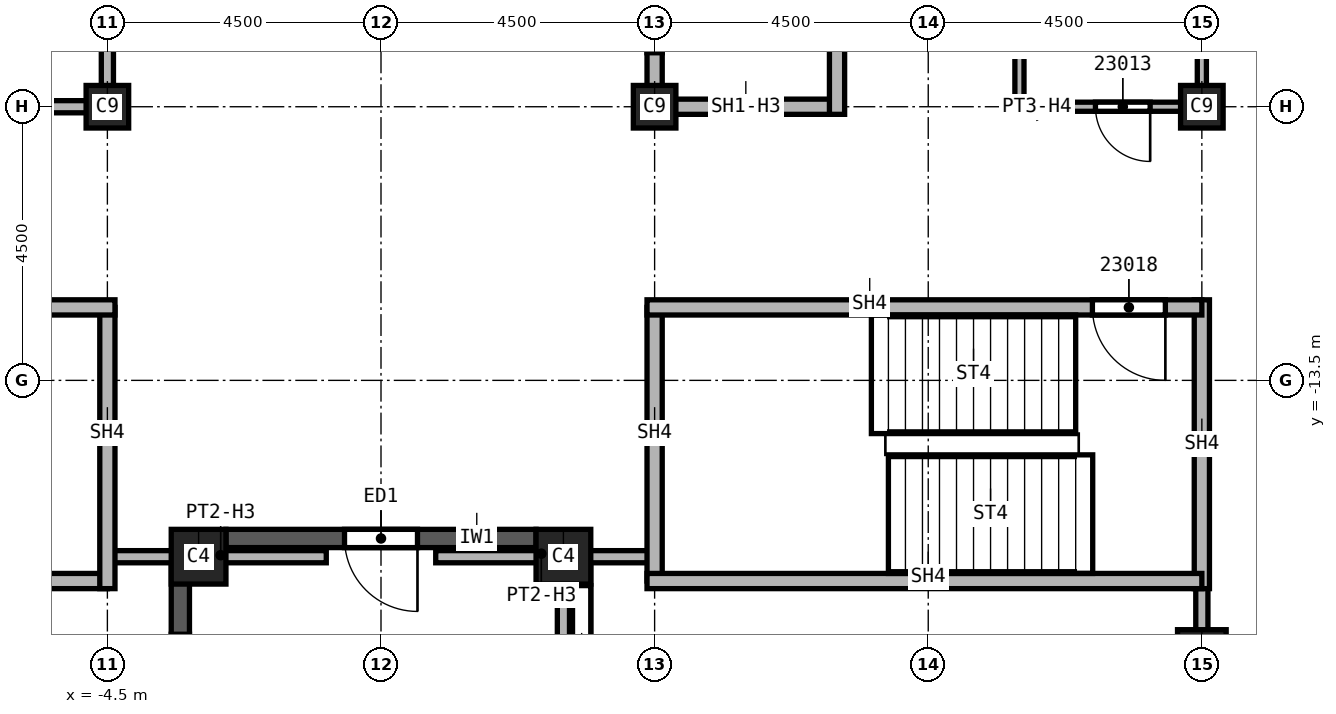
"""IFC4 building model, lengths in metres.
Left out: names, types, materials, properties, quantities, classifications, styles, units other than length and angle.
Written with IfcOpenShell. Run it as: python <this file> out.ifc"""

import sys

from ifc_helpers import new_model, si_unit, direction, frame, frame_2d, origin, origin_2d, place, context, subcontext, project, spatial, rectangle, extrude, element, fill, save


model = new_model("IFC4")
c1 = context("Model", 3, precision=1e-05, world=origin(), true_north=direction((0.0, 1.0)))
c2 = subcontext(c1, "Body", "Model", "MODEL_VIEW")
j1 = project(units=[si_unit("LENGTHUNIT", "METRE"), si_unit("PLANEANGLEUNIT", "RADIAN")], contexts=[c1])
p1 = place(None, origin())
s1 = spatial("IfcSite", under=j1, at=p1, CompositionType="ELEMENT")
p2 = place(p1, origin())
s2 = spatial("IfcBuilding", under=s1, at=p2, CompositionType="ELEMENT")
p3 = place(p2, frame((0.0, 0.0, 326.0)))
s3 = spatial("IfcBuildingStorey", under=s2, at=p3, CompositionType="ELEMENT", Elevation=326.0)
p4 = place(p3, frame((13.5, -18.0, 0.0), z_axis=(0.0, 0.0, 1.0), x_axis=(1.0, 0.0, 0.0)))
e1 = element("IfcColumn", 1, at=p4, inside=s3, PredefinedType="COLUMN", context=c2, shape_type="SweptSolid", body=[
    extrude(rectangle(XDim=0.8, YDim=0.8, at=origin_2d()), origin(), (0.0, 0.0, 1.0), 3.74),
])
for number, where, z_axis, x_axis in (
    (2, (4.5, -9.0, 0.0), (0.0, 0.0, 1.0), (1.0, 0.0, 0.0)),
    (3, (13.5, -9.0, 0.0), (0.0, 0.0, 1.0), (1.0, 0.0, 0.0)),
    (4, (-4.5, -9.0, 0.0), (0.0, 0.0, 1.0), (1.0, 0.0, 0.0)),
):
    element("IfcColumn", number, at=place(p3, frame(where, z_axis=z_axis, x_axis=x_axis)), inside=s3, PredefinedType="COLUMN", context=c2, shape_type="SweptSolid", body=[
        extrude(rectangle(XDim=0.7, YDim=0.7, at=origin_2d()), origin(), (0.0, 0.0, 1.0), 3.74),
    ])
for number, where, z_axis, x_axis in (
    (5, (3.0, -16.4, 0.0), (0.0, 0.0, 1.0), (1.0, 0.0, 0.0)),
    (6, (-3.0, -16.4, 0.0), (0.0, 0.0, 1.0), (1.0, 0.0, 0.0)),
):
    element("IfcColumn", number, at=place(p3, frame(where, z_axis=z_axis, x_axis=x_axis)), inside=s3, PredefinedType="COLUMN", context=c2, shape_type="SweptSolid", body=[
        extrude(rectangle(XDim=0.9, YDim=0.9, at=origin_2d()), origin(), (0.0, 0.0, 1.0), 3.74),
    ])
p5 = place(p3, frame((-3.3, -24.95, 0.0), z_axis=(0.0, 0.0, 1.0), x_axis=(0.0, 1.0, 0.0)))
e7 = element("IfcWall", 7, at=p5, inside=s3, PredefinedType="SOLIDWALL", context=c2, shape_type="SweptSolid", body=[
    extrude(rectangle(XDim=8.5, YDim=0.3, at=frame_2d((4.25, 0.0))), origin(), (0.0, 0.0, 1.0), 3.14),
])
p6 = place(p5, frame((0.825, 0.0, 0.8)))
e8 = element("IfcOpeningElement", 8, at=p6, cuts=e7, PredefinedType="OPENING", context=c2, shape_type="SweptSolid", body=[
    extrude(rectangle(XDim=2.4, YDim=1.95, at=frame_2d((1.2, 0.975))), frame((0.0, 0.15, 0.0), z_axis=(0.0, -1.0, 0.0), x_axis=(1.0, 0.0, 0.0)), (0.0, 0.0, 1.0), 0.3),
])
p7 = place(p5, frame((4.875, 0.0, 0.8)))
e9 = element("IfcOpeningElement", 9, at=p7, cuts=e7, PredefinedType="OPENING", context=c2, shape_type="SweptSolid", body=[
    extrude(rectangle(XDim=2.4, YDim=1.95, at=frame_2d((1.2, 0.975))), frame((0.0, 0.15, 0.0), z_axis=(0.0, -1.0, 0.0), x_axis=(1.0, 0.0, 0.0)), (0.0, 0.0, 1.0), 0.3),
])
p8 = place(p3, frame((2.55, -16.1, 0.0), z_axis=(0.0, 0.0, 1.0), x_axis=(-1.0, 0.0, 0.0)))
e10 = element("IfcWall", 10, at=p8, inside=s3, PredefinedType="SOLIDWALL", context=c2, shape_type="SweptSolid", body=[
    extrude(rectangle(XDim=5.1, YDim=0.3, at=frame_2d((2.55, 0.0))), origin(), (0.0, 0.0, 1.0), 3.14),
])
p9 = place(p8, frame((1.95, 0.0, 0.0)))
e11 = element("IfcOpeningElement", 11, at=p9, cuts=e10, PredefinedType="OPENING", context=c2, shape_type="SweptSolid", body=[
    extrude(rectangle(XDim=1.2, YDim=2.4, at=frame_2d((0.6, 1.2))), frame((0.0, 0.15, 0.0), z_axis=(0.0, -1.0, 0.0), x_axis=(1.0, 0.0, 0.0)), (0.0, 0.0, 1.0), 0.3),
])
p10 = place(p3, frame((3.3, -16.45, 0.0), z_axis=(0.0, 0.0, 1.0), x_axis=(0.0, -1.0, 0.0)))
e12 = element("IfcWall", 12, at=p10, inside=s3, PredefinedType="SOLIDWALL", context=c2, shape_type="SweptSolid", body=[
    extrude(rectangle(XDim=8.5, YDim=0.3, at=frame_2d((4.25, 0.0))), origin(), (0.0, 0.0, 1.0), 3.14),
])
p11 = place(p10, frame((0.425, 0.0, 0.8)))
e13 = element("IfcOpeningElement", 13, at=p11, cuts=e12, PredefinedType="OPENING", context=c2, shape_type="SweptSolid", body=[
    extrude(rectangle(XDim=2.4, YDim=1.95, at=frame_2d((1.2, 0.975))), frame((0.0, 0.15, 0.0), z_axis=(0.0, -1.0, 0.0), x_axis=(1.0, 0.0, 0.0)), (0.0, 0.0, 1.0), 0.3),
])
p12 = place(p10, frame((4.475, 0.0, 0.8)))
e14 = element("IfcOpeningElement", 14, at=p12, cuts=e12, PredefinedType="OPENING", context=c2, shape_type="SweptSolid", body=[
    extrude(rectangle(XDim=2.4, YDim=1.95, at=frame_2d((1.2, 0.975))), frame((0.0, 0.15, 0.0), z_axis=(0.0, -1.0, 0.0), x_axis=(1.0, 0.0, 0.0)), (0.0, 0.0, 1.0), 0.3),
])
p13 = place(p3, frame((-0.9, -16.4, 0.0), z_axis=(0.0, 0.0, 1.0), x_axis=(-1.0, 0.0, 0.0)))
e15 = element("IfcWall", 15, at=p13, inside=s3, PredefinedType="PARTITIONING", context=c2, shape_type="SweptSolid", body=[
    extrude(rectangle(XDim=3.6, YDim=0.2, at=frame_2d((1.8, 0.0))), origin(), (0.0, 0.0, 1.0), 3.204),
])
p14 = place(p3, frame((3.0, -16.4, 0.0), z_axis=(0.0, 0.0, 1.0), x_axis=(0.0, -1.0, 0.0)))
e16 = element("IfcWall", 16, at=p14, inside=s3, PredefinedType="PARTITIONING", context=c2, shape_type="SweptSolid", body=[
    extrude(rectangle(XDim=8.55, YDim=0.2, at=frame_2d((4.275, 0.0))), origin(), (0.0, 0.0, 1.0), 2.894),
])
p15 = place(p3, frame((4.5, -16.4, 0.0), z_axis=(0.0, 0.0, 1.0), x_axis=(-1.0, 0.0, 0.0)))
e17 = element("IfcWall", 17, at=p15, inside=s3, PredefinedType="PARTITIONING", context=c2, shape_type="SweptSolid", body=[
    extrude(rectangle(XDim=3.6, YDim=0.2, at=frame_2d((1.8, 0.0))), origin(), (0.0, 0.0, 1.0), 3.204),
])
p16 = place(p3, frame((13.5, -24.95, 0.0), z_axis=(0.0, 0.0, 1.0), x_axis=(0.0, 1.0, 0.0)))
e18 = element("IfcWall", 18, at=p16, inside=s3, PredefinedType="PARTITIONING", context=c2, shape_type="SweptSolid", body=[
    extrude(rectangle(XDim=8.275, YDim=0.2, at=frame_2d((4.137, 0.0))), origin(), (0.0, 0.0, 1.0), 3.74),
])
p17 = place(p16, frame((1.0, 0.0, 0.0)))
e19 = element("IfcOpeningElement", 19, at=p17, cuts=e18, PredefinedType="OPENING", context=c2, shape_type="SweptSolid", body=[
    extrude(rectangle(XDim=1.0, YDim=2.1, at=frame_2d((0.5, 1.05))), frame((0.0, 0.1, 0.0), z_axis=(0.0, -1.0, 0.0), x_axis=(1.0, 0.0, 0.0)), (0.0, 0.0, 1.0), 0.2),
])
p18 = place(p3, frame((-4.5, -9.0, 0.0), z_axis=(0.0, 0.0, 1.0), x_axis=(-1.0, 0.0, 0.0)))
e20 = element("IfcWall", 20, at=p18, inside=s3, PredefinedType="SOLIDWALL", context=c2, shape_type="SweptSolid", body=[
    extrude(rectangle(XDim=3.0, YDim=0.2, at=frame_2d((1.5, 0.0))), origin(), (0.0, 0.0, 1.0), 3.062),
])
p19 = place(p3, frame((-4.5, 6.0, 0.0), z_axis=(0.0, 0.0, 1.0), x_axis=(0.0, -1.0, 0.0)))
e21 = element("IfcWall", 21, at=p19, inside=s3, PredefinedType="SOLIDWALL", context=c2, shape_type="SweptSolid", body=[
    extrude(rectangle(XDim=15.1, YDim=0.2, at=frame_2d((7.55, 0.0))), origin(), (0.0, 0.0, 1.0), 3.062),
])
p20 = place(p19, frame((12.25, 0.0, 0.0)))
e22 = element("IfcOpeningElement", 22, at=p20, cuts=e21, PredefinedType="OPENING", context=c2, shape_type="SweptSolid", body=[
    extrude(rectangle(XDim=1.1, YDim=2.1, at=frame_2d((0.55, 1.05))), frame((0.0, 0.1, 0.0), z_axis=(0.0, -1.0, 0.0), x_axis=(1.0, 0.0, 0.0)), (0.0, 0.0, 1.0), 0.2),
])
p21 = place(p19, frame((8.2, 0.0, 0.0)))
e23 = element("IfcOpeningElement", 23, at=p21, cuts=e21, PredefinedType="OPENING", context=c2, shape_type="SweptSolid", body=[
    extrude(rectangle(XDim=1.1, YDim=2.1, at=frame_2d((0.55, 1.05))), frame((0.0, 0.1, 0.0), z_axis=(0.0, -1.0, 0.0), x_axis=(1.0, 0.0, 0.0)), (0.0, 0.0, 1.0), 0.2),
])
p22 = place(p3, frame((4.5, -9.125, 0.0), z_axis=(0.0, 0.0, 1.0), x_axis=(0.0, 1.0, 0.0)))
e24 = element("IfcWall", 24, at=p22, inside=s3, PredefinedType="SOLIDWALL", context=c2, shape_type="SweptSolid", body=[
    extrude(rectangle(XDim=3.125, YDim=0.25, at=frame_2d((1.562, 0.0))), origin(), (0.0, 0.0, 1.0), 3.062),
])
p23 = place(p22, frame((1.012, 0.0, 0.0)))
e25 = element("IfcOpeningElement", 25, at=p23, cuts=e24, PredefinedType="OPENING", context=c2, shape_type="SweptSolid", body=[
    extrude(rectangle(XDim=1.1, YDim=2.1, at=frame_2d((0.55, 1.05))), frame((0.0, 0.125, 0.0), z_axis=(0.0, -1.0, 0.0), x_axis=(1.0, 0.0, 0.0)), (0.0, 0.0, 1.0), 0.25),
])
p24 = place(p3, frame((7.5, -9.0, 0.0), z_axis=(0.0, 0.0, 1.0), x_axis=(-1.0, 0.0, 0.0)))
e26 = element("IfcWall", 26, at=p24, inside=s3, PredefinedType="SOLIDWALL", context=c2, shape_type="SweptSolid", body=[
    extrude(rectangle(XDim=3.0, YDim=0.25, at=frame_2d((1.5, 0.0))), origin(), (0.0, 0.0, 1.0), 3.062),
])
p25 = place(p3, frame((7.5, -6.0, 0.0), z_axis=(0.0, 0.0, 1.0), x_axis=(0.0, -1.0, 0.0)))
e27 = element("IfcWall", 27, at=p25, inside=s3, PredefinedType="SOLIDWALL", context=c2, shape_type="SweptSolid", body=[
    extrude(rectangle(XDim=3.125, YDim=0.25, at=frame_2d((1.562, 0.0))), origin(), (0.0, 0.0, 1.0), 3.74),
])
p26 = place(p3, frame((-4.5, -16.8, 0.0), z_axis=(0.0, 0.0, 1.0), x_axis=(-1.0, 0.0, 0.0)))
e28 = element("IfcWall", 28, at=p26, inside=s3, PredefinedType="SOLIDWALL", context=c2, shape_type="SweptSolid", body=[
    extrude(rectangle(XDim=9.0, YDim=0.25, at=frame_2d((4.5, 0.0))), origin(), (0.0, 0.0, 1.0), 3.74),
])
p27 = place(p3, frame((-4.5, -12.3, 0.0), z_axis=(0.0, 0.0, 1.0), x_axis=(0.0, -1.0, 0.0)))
e29 = element("IfcWall", 29, at=p27, inside=s3, PredefinedType="SOLIDWALL", context=c2, shape_type="SweptSolid", body=[
    extrude(rectangle(XDim=4.625, YDim=0.25, at=frame_2d((2.312, 0.0))), origin(), (0.0, 0.0, 1.0), 3.74),
])
p28 = place(p3, frame((-4.375, -12.3, 0.0), z_axis=(0.0, 0.0, 1.0), x_axis=(-1.0, 0.0, 0.0)))
e30 = element("IfcWall", 30, at=p28, inside=s3, PredefinedType="SOLIDWALL", context=c2, shape_type="SweptSolid", body=[
    extrude(rectangle(XDim=9.125, YDim=0.25, at=frame_2d((4.562, 0.0))), origin(), (0.0, 0.0, 1.0), 3.74),
])
p29 = place(p28, frame((7.2, 0.0, 0.0)))
e31 = element("IfcOpeningElement", 31, at=p29, cuts=e30, PredefinedType="OPENING", context=c2, shape_type="SweptSolid", body=[
    extrude(rectangle(XDim=1.2, YDim=2.1, at=frame_2d((0.6, 1.05))), frame((0.0, 0.125, 0.0), z_axis=(0.0, -1.0, 0.0), x_axis=(1.0, 0.0, 0.0)), (0.0, 0.0, 1.0), 0.25),
])
p30 = place(p3, frame((4.5, -16.8, 0.0), z_axis=(0.0, 0.0, 1.0), x_axis=(0.0, 1.0, 0.0)))
e32 = element("IfcWall", 32, at=p30, inside=s3, PredefinedType="SOLIDWALL", context=c2, shape_type="SweptSolid", body=[
    extrude(rectangle(XDim=4.5, YDim=0.25, at=frame_2d((2.25, 0.0))), origin(), (0.0, 0.0, 1.0), 3.74),
])
p31 = place(p3, frame((13.5, -16.925, 0.0), z_axis=(0.0, 0.0, 1.0), x_axis=(0.0, 1.0, 0.0)))
e33 = element("IfcWall", 33, at=p31, inside=s3, PredefinedType="SOLIDWALL", context=c2, shape_type="SweptSolid", body=[
    extrude(rectangle(XDim=4.75, YDim=0.25, at=frame_2d((2.375, 0.0))), origin(), (0.0, 0.0, 1.0), 3.74),
])
p32 = place(p3, frame((13.5, -16.8, 0.0), z_axis=(0.0, 0.0, 1.0), x_axis=(-1.0, 0.0, 0.0)))
e34 = element("IfcWall", 34, at=p32, inside=s3, PredefinedType="SOLIDWALL", context=c2, shape_type="SweptSolid", body=[
    extrude(rectangle(XDim=9.125, YDim=0.25, at=frame_2d((4.562, 0.0))), origin(), (0.0, 0.0, 1.0), 3.74),
])
p33 = place(p3, frame((13.5, -12.3, 0.0), z_axis=(0.0, 0.0, 1.0), x_axis=(-1.0, 0.0, 0.0)))
e35 = element("IfcWall", 35, at=p33, inside=s3, PredefinedType="SOLIDWALL", context=c2, shape_type="SweptSolid", body=[
    extrude(rectangle(XDim=9.125, YDim=0.25, at=frame_2d((4.562, 0.0))), origin(), (0.0, 0.0, 1.0), 3.74),
])
p34 = place(p33, frame((0.6, 0.0, 0.0)))
e36 = element("IfcOpeningElement", 36, at=p34, cuts=e35, PredefinedType="OPENING", context=c2, shape_type="SweptSolid", body=[
    extrude(rectangle(XDim=1.2, YDim=2.1, at=frame_2d((0.6, 1.05))), frame((0.0, 0.125, 0.0), z_axis=(0.0, -1.0, 0.0), x_axis=(1.0, 0.0, 0.0)), (0.0, 0.0, 1.0), 0.25),
])
p35 = place(p3, frame((10.5, -6.925, 0.0), z_axis=(0.0, 0.0, 1.0), x_axis=(0.0, -1.0, 0.0)))
e37 = element("IfcWall", 37, at=p35, inside=s3, PredefinedType="PARTITIONING", context=c2, shape_type="SweptSolid", body=[
    extrude(rectangle(XDim=2.15, YDim=0.15, at=frame_2d((1.075, 0.0))), origin(), (0.0, 0.0, 1.0), 3.74),
])
p36 = place(p3, frame((13.5, -9.0, 0.0), z_axis=(0.0, 0.0, 1.0), x_axis=(-1.0, 0.0, 0.0)))
e38 = element("IfcWall", 38, at=p36, inside=s3, PredefinedType="PARTITIONING", context=c2, shape_type="SweptSolid", body=[
    extrude(rectangle(XDim=3.0, YDim=0.15, at=frame_2d((1.5, 0.0))), origin(), (0.0, 0.0, 1.0), 3.062),
])
p37 = place(p36, frame((0.85, 0.0, 0.0)))
e39 = element("IfcOpeningElement", 39, at=p37, cuts=e38, PredefinedType="OPENING", context=c2, shape_type="SweptSolid", body=[
    extrude(rectangle(XDim=0.9, YDim=2.1, at=frame_2d((0.45, 1.05))), frame((0.0, 0.075, 0.0), z_axis=(0.0, -1.0, 0.0), x_axis=(1.0, 0.0, 0.0)), (0.0, 0.0, 1.0), 0.15),
])
p38 = place(p3, frame((13.5, -7.0, 0.0), z_axis=(0.0, 0.0, 1.0), x_axis=(0.0, -1.0, 0.0)))
e40 = element("IfcWall", 40, at=p38, inside=s3, PredefinedType="PARTITIONING", context=c2, shape_type="SweptSolid", body=[
    extrude(rectangle(XDim=2.075, YDim=0.15, at=frame_2d((1.038, 0.0))), origin(), (0.0, 0.0, 1.0), 3.062),
])
p39 = place(p9, origin())
e41 = element("IfcDoor", 41, at=p39, inside=s3, OperationType="SINGLE_SWING_LEFT", PredefinedType="DOOR", context=c2, shape_type="SweptSolid", body=[
    extrude(rectangle(XDim=1.2, YDim=2.4, at=frame_2d((0.6, 1.2))), frame((0.0, 0.025, 0.0), z_axis=(0.0, -1.0, 0.0), x_axis=(1.0, 0.0, 0.0)), (0.0, 0.0, 1.0), 0.05),
])
fill(e11, e41)
p40 = place(p11, origin())
e42 = element("IfcWindow", 42, at=p40, inside=s3, PartitioningType="SINGLE_PANEL", PredefinedType="WINDOW", context=c2, shape_type="SweptSolid", body=[
    extrude(rectangle(XDim=2.4, YDim=1.95, at=frame_2d((1.2, 0.975))), frame((0.0, 0.03, 0.0), z_axis=(0.0, -1.0, 0.0), x_axis=(1.0, 0.0, 0.0)), (0.0, 0.0, 1.0), 0.06),
])
fill(e13, e42)
p41 = place(p37, origin())
e43 = element("IfcDoor", 43, at=p41, inside=s3, OperationType="SINGLE_SWING_RIGHT", PredefinedType="DOOR", context=c2, shape_type="SweptSolid", body=[
    extrude(rectangle(XDim=0.9, YDim=2.1, at=frame_2d((0.45, 1.05))), frame((0.0, 0.025, 0.0), z_axis=(0.0, -1.0, 0.0), x_axis=(1.0, 0.0, 0.0)), (0.0, 0.0, 1.0), 0.05),
])
fill(e39, e43)
p42 = place(p34, origin())
e44 = element("IfcDoor", 44, at=p42, inside=s3, OperationType="SINGLE_SWING_LEFT", PredefinedType="DOOR", context=c2, shape_type="SweptSolid", body=[
    extrude(rectangle(XDim=1.2, YDim=2.1, at=frame_2d((0.6, 1.05))), frame((0.0, 0.025, 0.0), z_axis=(0.0, -1.0, 0.0), x_axis=(1.0, 0.0, 0.0)), (0.0, 0.0, 1.0), 0.05),
])
fill(e36, e44)
p43 = place(p23, origin())
e45 = element("IfcDoor", 45, at=p43, inside=s3, OperationType="SLIDING_TO_LEFT", PredefinedType="DOOR", context=c2, shape_type="SweptSolid", body=[
    extrude(rectangle(XDim=1.1, YDim=2.1, at=frame_2d((0.55, 1.05))), frame((0.0, 0.025, 0.0), z_axis=(0.0, -1.0, 0.0), x_axis=(1.0, 0.0, 0.0)), (0.0, 0.0, 1.0), 0.05),
])
fill(e25, e45)
save(model, sys.argv[1])
